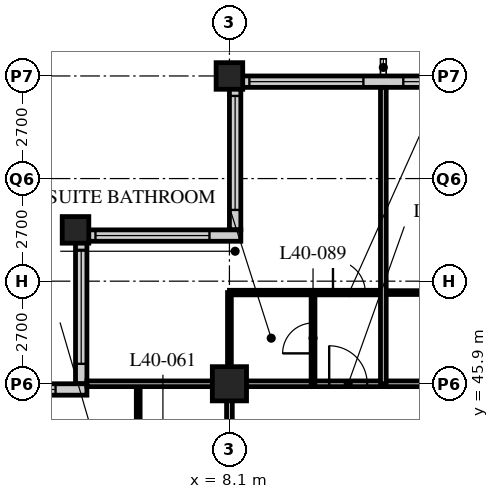
"""IFC4 building model, lengths in metres.
Left out: names, types, materials, properties, quantities, classifications, styles, units other than length and angle.
Written with IfcOpenShell. Run it as: python <this file> out.ifc"""

import sys

from ifc_helpers import new_model, si_unit, direction, frame, frame_2d, origin, origin_2d, place, context, subcontext, project, spatial, rectangle, hollow_rectangle, extrude, element, fill, save


model = new_model("IFC4")
c1 = context("Model", 3, precision=1e-05, world=origin(), true_north=direction((0.0, 1.0)))
c2 = subcontext(c1, "Body", "Model", "MODEL_VIEW")
j1 = project(units=[si_unit("LENGTHUNIT", "METRE"), si_unit("PLANEANGLEUNIT", "RADIAN")], contexts=[c1])
p1 = place(None, origin())
s1 = spatial("IfcSite", under=j1, at=p1, CompositionType="ELEMENT")
p2 = place(p1, origin())
s2 = spatial("IfcBuilding", under=s1, at=p2, CompositionType="ELEMENT")
p3 = place(p2, frame((0.0, 0.0, 154.4)))
s3 = spatial("IfcBuildingStorey", under=s2, at=p3, CompositionType="ELEMENT", Elevation=154.4)
p4 = place(p3, frame((4.05, 49.95, 0.0), z_axis=(0.0, 0.0, 1.0), x_axis=(1.0, 0.0, 0.0)))
e1 = element("IfcColumn", 1, at=p4, inside=s3, PredefinedType="COLUMN", context=c2, shape_type="SweptSolid", body=[
    extrude(hollow_rectangle(XDim=0.7, YDim=0.7, WallThickness=0.07, at=origin_2d()), origin(), (0.0, 0.0, 1.0), 3.4),
])
p5 = place(p3, frame((8.1, 45.9, 0.0), z_axis=(0.0, 0.0, 1.0), x_axis=(1.0, 0.0, 0.0)))
e2 = element("IfcColumn", 2, at=p5, inside=s3, PredefinedType="COLUMN", context=c2, shape_type="SweptSolid", body=[
    extrude(hollow_rectangle(XDim=0.9, YDim=0.9, WallThickness=0.1, at=origin_2d()), origin(), (0.0, 0.0, 1.0), 3.4),
])
p6 = place(p3, frame((8.1, 54.0, 0.0), z_axis=(0.0, 0.0, 1.0), x_axis=(1.0, 0.0, 0.0)))
e3 = element("IfcColumn", 3, at=p6, inside=s3, PredefinedType="COLUMN", context=c2, shape_type="SweptSolid", body=[
    extrude(hollow_rectangle(XDim=0.7, YDim=0.7, WallThickness=0.07, at=origin_2d()), origin(), (0.0, 0.0, 1.0), 3.4),
])
p7 = place(p3, frame((48.3, 53.85, 0.0), z_axis=(0.0, 0.0, 1.0), x_axis=(-1.0, 0.0, 0.0)))
e4 = element("IfcWall", 4, at=p7, inside=s3, PredefinedType="SOLIDWALL", context=c2, shape_type="SweptSolid", body=[
    extrude(rectangle(XDim=40.2, YDim=0.3, at=frame_2d((20.1, 0.0))), origin(), (0.0, 0.0, 1.0), 2.15),
])
p8 = place(p7, frame((0.225, 0.0, 0.9)))
e5 = element("IfcOpeningElement", 5, at=p8, cuts=e4, PredefinedType="OPENING", context=c2, shape_type="SweptSolid", body=[
    extrude(rectangle(XDim=3.0, YDim=1.2, at=frame_2d((1.5, 0.6))), frame((0.0, 0.16, 0.0), z_axis=(0.0, -1.0, 0.0), x_axis=(1.0, 0.0, 0.0)), (0.0, 0.0, 1.0), 0.32),
])
p9 = place(p7, frame((4.275, 0.0, 0.9)))
e6 = element("IfcOpeningElement", 6, at=p9, cuts=e4, PredefinedType="OPENING", context=c2, shape_type="SweptSolid", body=[
    extrude(rectangle(XDim=3.0, YDim=1.2, at=frame_2d((1.5, 0.6))), frame((0.0, 0.16, 0.0), z_axis=(0.0, -1.0, 0.0), x_axis=(1.0, 0.0, 0.0)), (0.0, 0.0, 1.0), 0.32),
])
p10 = place(p7, frame((8.325, 0.0, 0.9)))
e7 = element("IfcOpeningElement", 7, at=p10, cuts=e4, PredefinedType="OPENING", context=c2, shape_type="SweptSolid", body=[
    extrude(rectangle(XDim=3.0, YDim=1.2, at=frame_2d((1.5, 0.6))), frame((0.0, 0.16, 0.0), z_axis=(0.0, -1.0, 0.0), x_axis=(1.0, 0.0, 0.0)), (0.0, 0.0, 1.0), 0.32),
])
p11 = place(p7, frame((12.375, 0.0, 0.9)))
e8 = element("IfcOpeningElement", 8, at=p11, cuts=e4, PredefinedType="OPENING", context=c2, shape_type="SweptSolid", body=[
    extrude(rectangle(XDim=3.0, YDim=1.2, at=frame_2d((1.5, 0.6))), frame((0.0, 0.16, 0.0), z_axis=(0.0, -1.0, 0.0), x_axis=(1.0, 0.0, 0.0)), (0.0, 0.0, 1.0), 0.32),
])
p12 = place(p7, frame((16.425, 0.0, 0.9)))
e9 = element("IfcOpeningElement", 9, at=p12, cuts=e4, PredefinedType="OPENING", context=c2, shape_type="SweptSolid", body=[
    extrude(rectangle(XDim=3.0, YDim=1.2, at=frame_2d((1.5, 0.6))), frame((0.0, 0.16, 0.0), z_axis=(0.0, -1.0, 0.0), x_axis=(1.0, 0.0, 0.0)), (0.0, 0.0, 1.0), 0.32),
])
p13 = place(p7, frame((20.475, 0.0, 0.9)))
e10 = element("IfcOpeningElement", 10, at=p13, cuts=e4, PredefinedType="OPENING", context=c2, shape_type="SweptSolid", body=[
    extrude(rectangle(XDim=3.0, YDim=1.2, at=frame_2d((1.5, 0.6))), frame((0.0, 0.16, 0.0), z_axis=(0.0, -1.0, 0.0), x_axis=(1.0, 0.0, 0.0)), (0.0, 0.0, 1.0), 0.32),
])
p14 = place(p7, frame((24.525, 0.0, 0.9)))
e11 = element("IfcOpeningElement", 11, at=p14, cuts=e4, PredefinedType="OPENING", context=c2, shape_type="SweptSolid", body=[
    extrude(rectangle(XDim=3.0, YDim=1.2, at=frame_2d((1.5, 0.6))), frame((0.0, 0.16, 0.0), z_axis=(0.0, -1.0, 0.0), x_axis=(1.0, 0.0, 0.0)), (0.0, 0.0, 1.0), 0.32),
])
p15 = place(p7, frame((28.575, 0.0, 0.9)))
e12 = element("IfcOpeningElement", 12, at=p15, cuts=e4, PredefinedType="OPENING", context=c2, shape_type="SweptSolid", body=[
    extrude(rectangle(XDim=3.0, YDim=1.2, at=frame_2d((1.5, 0.6))), frame((0.0, 0.16, 0.0), z_axis=(0.0, -1.0, 0.0), x_axis=(1.0, 0.0, 0.0)), (0.0, 0.0, 1.0), 0.32),
])
p16 = place(p7, frame((32.625, 0.0, 0.9)))
e13 = element("IfcOpeningElement", 13, at=p16, cuts=e4, PredefinedType="OPENING", context=c2, shape_type="SweptSolid", body=[
    extrude(rectangle(XDim=3.0, YDim=1.2, at=frame_2d((1.5, 0.6))), frame((0.0, 0.16, 0.0), z_axis=(0.0, -1.0, 0.0), x_axis=(1.0, 0.0, 0.0)), (0.0, 0.0, 1.0), 0.32),
])
p17 = place(p7, frame((36.675, 0.0, 0.9)))
e14 = element("IfcOpeningElement", 14, at=p17, cuts=e4, PredefinedType="OPENING", context=c2, shape_type="SweptSolid", body=[
    extrude(rectangle(XDim=3.0, YDim=1.2, at=frame_2d((1.5, 0.6))), frame((0.0, 0.16, 0.0), z_axis=(0.0, -1.0, 0.0), x_axis=(1.0, 0.0, 0.0)), (0.0, 0.0, 1.0), 0.32),
])
p18 = place(p3, frame((8.25, 53.7, 0.0), z_axis=(0.0, 0.0, 1.0), x_axis=(0.0, -1.0, 0.0)))
e15 = element("IfcWall", 15, at=p18, inside=s3, PredefinedType="SOLIDWALL", context=c2, shape_type="SweptSolid", body=[
    extrude(rectangle(XDim=3.75, YDim=0.3, at=frame_2d((1.875, 0.0))), origin(), (0.0, 0.0, 1.0), 2.15),
])
p19 = place(p18, frame((0.225, 0.0, 0.9)))
e16 = element("IfcOpeningElement", 16, at=p19, cuts=e15, PredefinedType="OPENING", context=c2, shape_type="SweptSolid", body=[
    extrude(rectangle(XDim=3.0, YDim=1.2, at=frame_2d((1.5, 0.6))), frame((0.0, 0.16, 0.0), z_axis=(0.0, -1.0, 0.0), x_axis=(1.0, 0.0, 0.0)), (0.0, 0.0, 1.0), 0.32),
])
p20 = place(p3, frame((8.4, 49.8, 0.0), z_axis=(0.0, 0.0, 1.0), x_axis=(-1.0, 0.0, 0.0)))
e17 = element("IfcWall", 17, at=p20, inside=s3, PredefinedType="SOLIDWALL", context=c2, shape_type="SweptSolid", body=[
    extrude(rectangle(XDim=4.35, YDim=0.3, at=frame_2d((2.175, 0.0))), origin(), (0.0, 0.0, 1.0), 2.45),
])
p21 = place(p20, frame((0.825, 0.0, 0.9)))
e18 = element("IfcOpeningElement", 18, at=p21, cuts=e17, PredefinedType="OPENING", context=c2, shape_type="SweptSolid", body=[
    extrude(rectangle(XDim=3.0, YDim=1.2, at=frame_2d((1.5, 0.6))), frame((0.0, 0.16, 0.0), z_axis=(0.0, -1.0, 0.0), x_axis=(1.0, 0.0, 0.0)), (0.0, 0.0, 1.0), 0.32),
])
p22 = place(p3, frame((4.2, 49.65, 0.0), z_axis=(0.0, 0.0, 1.0), x_axis=(0.0, -1.0, 0.0)))
e19 = element("IfcWall", 19, at=p22, inside=s3, PredefinedType="SOLIDWALL", context=c2, shape_type="SweptSolid", body=[
    extrude(rectangle(XDim=3.75, YDim=0.3, at=frame_2d((1.875, 0.0))), origin(), (0.0, 0.0, 1.0), 2.45),
])
p23 = place(p22, frame((0.225, 0.0, 0.9)))
e20 = element("IfcOpeningElement", 20, at=p23, cuts=e19, PredefinedType="OPENING", context=c2, shape_type="SweptSolid", body=[
    extrude(rectangle(XDim=3.0, YDim=1.2, at=frame_2d((1.5, 0.6))), frame((0.0, 0.16, 0.0), z_axis=(0.0, -1.0, 0.0), x_axis=(1.0, 0.0, 0.0)), (0.0, 0.0, 1.0), 0.32),
])
p24 = place(p3, frame((4.35, 45.75, 0.0), z_axis=(0.0, 0.0, 1.0), x_axis=(-1.0, 0.0, 0.0)))
e21 = element("IfcWall", 21, at=p24, inside=s3, PredefinedType="SOLIDWALL", context=c2, shape_type="SweptSolid", body=[
    extrude(rectangle(XDim=4.35, YDim=0.3, at=frame_2d((2.175, 0.0))), origin(), (0.0, 0.0, 1.0), 2.15),
])
p25 = place(p24, frame((0.825, 0.0, 0.9)))
e22 = element("IfcOpeningElement", 22, at=p25, cuts=e21, PredefinedType="OPENING", context=c2, shape_type="SweptSolid", body=[
    extrude(rectangle(XDim=3.0, YDim=1.2, at=frame_2d((1.5, 0.6))), frame((0.0, 0.16, 0.0), z_axis=(0.0, -1.0, 0.0), x_axis=(1.0, 0.0, 0.0)), (0.0, 0.0, 1.0), 0.32),
])
p26 = place(p3, frame((8.1, 45.9, 0.0), z_axis=(0.0, 0.0, 1.0), x_axis=(1.0, 0.0, 0.0)))
e23 = element("IfcWall", 23, at=p26, inside=s3, PredefinedType="PARTITIONING", context=c2, shape_type="SweptSolid", body=[
    extrude(rectangle(XDim=40.5, YDim=0.15, at=frame_2d((20.25, 0.0))), origin(), (0.0, 0.0, 1.0), 2.15),
])
p27 = place(p26, frame((9.625, 0.0, 0.0)))
e24 = element("IfcOpeningElement", 24, at=p27, cuts=e23, PredefinedType="OPENING", context=c2, shape_type="SweptSolid", body=[
    extrude(rectangle(XDim=1.0, YDim=2.1, at=frame_2d((0.5, 1.05))), frame((0.0, 0.085, 0.0), z_axis=(0.0, -1.0, 0.0), x_axis=(1.0, 0.0, 0.0)), (0.0, 0.0, 1.0), 0.17),
])
p28 = place(p26, frame((21.775, 0.0, 0.0)))
e25 = element("IfcOpeningElement", 25, at=p28, cuts=e23, PredefinedType="OPENING", context=c2, shape_type="SweptSolid", body=[
    extrude(rectangle(XDim=1.0, YDim=2.1, at=frame_2d((0.5, 1.05))), frame((0.0, 0.085, 0.0), z_axis=(0.0, -1.0, 0.0), x_axis=(1.0, 0.0, 0.0)), (0.0, 0.0, 1.0), 0.17),
])
p29 = place(p26, frame((28.95, 0.0, 0.0)))
e26 = element("IfcOpeningElement", 26, at=p29, cuts=e23, PredefinedType="OPENING", context=c2, shape_type="SweptSolid", body=[
    extrude(rectangle(XDim=1.0, YDim=2.1, at=frame_2d((0.5, 1.05))), frame((0.0, 0.085, 0.0), z_axis=(0.0, -1.0, 0.0), x_axis=(1.0, 0.0, 0.0)), (0.0, 0.0, 1.0), 0.17),
])
p30 = place(p26, frame((34.85, 0.0, 0.0)))
e27 = element("IfcOpeningElement", 27, at=p30, cuts=e23, PredefinedType="OPENING", context=c2, shape_type="SweptSolid", body=[
    extrude(rectangle(XDim=1.0, YDim=2.1, at=frame_2d((0.5, 1.05))), frame((0.0, 0.085, 0.0), z_axis=(0.0, -1.0, 0.0), x_axis=(1.0, 0.0, 0.0)), (0.0, 0.0, 1.0), 0.17),
])
p31 = place(p26, frame((36.875, 0.0, 0.0)))
e28 = element("IfcOpeningElement", 28, at=p31, cuts=e23, PredefinedType="OPENING", context=c2, shape_type="SweptSolid", body=[
    extrude(rectangle(XDim=1.0, YDim=2.1, at=frame_2d((0.5, 1.05))), frame((0.0, 0.085, 0.0), z_axis=(0.0, -1.0, 0.0), x_axis=(1.0, 0.0, 0.0)), (0.0, 0.0, 1.0), 0.17),
])
p32 = place(p26, frame((2.625, 0.0, 0.0)))
e29 = element("IfcOpeningElement", 29, at=p32, cuts=e23, PredefinedType="OPENING", context=c2, shape_type="SweptSolid", body=[
    extrude(rectangle(XDim=1.0, YDim=2.1, at=frame_2d((0.5, 1.05))), frame((0.0, 0.085, 0.0), z_axis=(0.0, -1.0, 0.0), x_axis=(1.0, 0.0, 0.0)), (0.0, 0.0, 1.0), 0.17),
])
p33 = place(p3, frame((8.1, 17.55, 0.0), z_axis=(0.0, 0.0, 1.0), x_axis=(0.0, 1.0, 0.0)))
e30 = element("IfcWall", 30, at=p33, inside=s3, PredefinedType="PARTITIONING", context=c2, shape_type="SweptSolid", body=[
    extrude(rectangle(XDim=28.35, YDim=0.15, at=frame_2d((14.175, 0.0))), origin(), (0.0, 0.0, 1.0), 2.15),
])
p34 = place(p33, frame((5.95, 0.0, 0.0)))
e31 = element("IfcOpeningElement", 31, at=p34, cuts=e30, PredefinedType="OPENING", context=c2, shape_type="SweptSolid", body=[
    extrude(rectangle(XDim=1.0, YDim=2.1, at=frame_2d((0.5, 1.05))), frame((0.0, 0.085, 0.0), z_axis=(0.0, -1.0, 0.0), x_axis=(1.0, 0.0, 0.0)), (0.0, 0.0, 1.0), 0.17),
])
p35 = place(p33, frame((16.8, 0.0, 0.0)))
e32 = element("IfcOpeningElement", 32, at=p35, cuts=e30, PredefinedType="OPENING", context=c2, shape_type="SweptSolid", body=[
    extrude(rectangle(XDim=1.0, YDim=2.1, at=frame_2d((0.5, 1.05))), frame((0.0, 0.085, 0.0), z_axis=(0.0, -1.0, 0.0), x_axis=(1.0, 0.0, 0.0)), (0.0, 0.0, 1.0), 0.17),
])
p36 = place(p33, frame((22.7, 0.0, 0.0)))
e33 = element("IfcOpeningElement", 33, at=p36, cuts=e30, PredefinedType="OPENING", context=c2, shape_type="SweptSolid", body=[
    extrude(rectangle(XDim=1.0, YDim=2.1, at=frame_2d((0.5, 1.05))), frame((0.0, 0.085, 0.0), z_axis=(0.0, -1.0, 0.0), x_axis=(1.0, 0.0, 0.0)), (0.0, 0.0, 1.0), 0.17),
])
p37 = place(p33, frame((24.9, 0.0, 0.0)))
e34 = element("IfcOpeningElement", 34, at=p37, cuts=e30, PredefinedType="OPENING", context=c2, shape_type="SweptSolid", body=[
    extrude(rectangle(XDim=1.0, YDim=2.1, at=frame_2d((0.5, 1.05))), frame((0.0, 0.085, 0.0), z_axis=(0.0, -1.0, 0.0), x_axis=(1.0, 0.0, 0.0)), (0.0, 0.0, 1.0), 0.17),
])
p38 = place(p3, frame((12.15, 48.3, 0.0), z_axis=(0.0, 0.0, 1.0), x_axis=(1.0, 0.0, 0.0)))
e35 = element("IfcWall", 35, at=p38, inside=s3, PredefinedType="PARTITIONING", context=c2, shape_type="SweptSolid", body=[
    extrude(rectangle(XDim=2.6, YDim=0.1, at=frame_2d((1.3, 0.0))), origin(), (0.0, 0.0, 1.0), 3.15),
])
p39 = place(p3, frame((5.7, 43.6, 0.0), z_axis=(0.0, 0.0, 1.0), x_axis=(0.0, 1.0, 0.0)))
e36 = element("IfcWall", 36, at=p39, inside=s3, PredefinedType="PARTITIONING", context=c2, shape_type="SweptSolid", body=[
    extrude(rectangle(XDim=2.3, YDim=0.1, at=frame_2d((1.15, 0.0))), origin(), (0.0, 0.0, 1.0), 3.15),
])
p40 = place(p3, frame((8.1, 48.3, 0.0), z_axis=(0.0, 0.0, 1.0), x_axis=(1.0, 0.0, 0.0)))
e37 = element("IfcWall", 37, at=p40, inside=s3, PredefinedType="PARTITIONING", context=c2, shape_type="SweptSolid", body=[
    extrude(rectangle(XDim=4.05, YDim=0.12, at=frame_2d((2.025, 0.0))), origin(), (0.0, 0.0, 1.0), 3.15),
])
p41 = place(p40, frame((2.725, 0.0, 0.0)))
e38 = element("IfcOpeningElement", 38, at=p41, cuts=e37, PredefinedType="OPENING", context=c2, shape_type="SweptSolid", body=[
    extrude(rectangle(XDim=0.85, YDim=2.1, at=frame_2d((0.425, 1.05))), frame((0.0, 0.07, 0.0), z_axis=(0.0, -1.0, 0.0), x_axis=(1.0, 0.0, 0.0)), (0.0, 0.0, 1.0), 0.14),
])
p42 = place(p3, frame((10.3, 45.9, 0.0), z_axis=(0.0, 0.0, 1.0), x_axis=(0.0, 1.0, 0.0)))
e39 = element("IfcWall", 39, at=p42, inside=s3, PredefinedType="PARTITIONING", context=c2, shape_type="SweptSolid", body=[
    extrude(rectangle(XDim=2.4, YDim=0.1, at=frame_2d((1.2, 0.0))), origin(), (0.0, 0.0, 1.0), 3.15),
])
p43 = place(p42, frame((0.8, 0.0, 0.0)))
e40 = element("IfcOpeningElement", 40, at=p43, cuts=e39, PredefinedType="OPENING", context=c2, shape_type="SweptSolid", body=[
    extrude(rectangle(XDim=0.8, YDim=2.1, at=frame_2d((0.4, 1.05))), frame((0.0, 0.06, 0.0), z_axis=(0.0, -1.0, 0.0), x_axis=(1.0, 0.0, 0.0)), (0.0, 0.0, 1.0), 0.12),
])
p44 = place(p3, frame((8.1, 45.9, 0.0), z_axis=(0.0, 0.0, 1.0), x_axis=(0.0, 1.0, 0.0)))
e41 = element("IfcWall", 41, at=p44, inside=s3, PredefinedType="PARTITIONING", context=c2, shape_type="SweptSolid", body=[
    extrude(rectangle(XDim=2.4, YDim=0.1, at=frame_2d((1.2, 0.0))), origin(), (0.0, 0.0, 1.0), 2.15),
])
p45 = place(p3, frame((4.35, 45.9, 0.0), z_axis=(0.0, 0.0, 1.0), x_axis=(1.0, 0.0, 0.0)))
e42 = element("IfcWall", 42, at=p45, inside=s3, PredefinedType="PARTITIONING", context=c2, shape_type="SweptSolid", body=[
    extrude(rectangle(XDim=3.75, YDim=0.15, at=frame_2d((1.875, 0.0))), origin(), (0.0, 0.0, 1.0), 2.15),
])
p46 = place(p3, frame((12.15, 45.9, 0.0), z_axis=(0.0, 0.0, 1.0), x_axis=(0.0, 1.0, 0.0)))
e43 = element("IfcWall", 43, at=p46, inside=s3, PredefinedType="PARTITIONING", context=c2, shape_type="SweptSolid", body=[
    extrude(rectangle(XDim=7.8, YDim=0.15, at=frame_2d((3.9, 0.0))), origin(), (0.0, 0.0, 1.0), 3.15),
])
p47 = place(p16, origin())
e44 = element("IfcWindow", 44, at=p47, inside=s3, PartitioningType="SINGLE_PANEL", PredefinedType="WINDOW", context=c2, shape_type="SweptSolid", body=[
    extrude(rectangle(XDim=3.0, YDim=1.2, at=frame_2d((1.5, 0.6))), frame((0.0, 0.03, 0.0), z_axis=(0.0, -1.0, 0.0), x_axis=(1.0, 0.0, 0.0)), (0.0, 0.0, 1.0), 0.06),
])
fill(e13, e44)
p48 = place(p17, origin())
e45 = element("IfcWindow", 45, at=p48, inside=s3, PartitioningType="SINGLE_PANEL", PredefinedType="WINDOW", context=c2, shape_type="SweptSolid", body=[
    extrude(rectangle(XDim=3.0, YDim=1.2, at=frame_2d((1.5, 0.6))), frame((0.0, 0.03, 0.0), z_axis=(0.0, -1.0, 0.0), x_axis=(1.0, 0.0, 0.0)), (0.0, 0.0, 1.0), 0.06),
])
fill(e14, e45)
p49 = place(p19, origin())
e46 = element("IfcWindow", 46, at=p49, inside=s3, PartitioningType="SINGLE_PANEL", PredefinedType="WINDOW", context=c2, shape_type="SweptSolid", body=[
    extrude(rectangle(XDim=3.0, YDim=1.2, at=frame_2d((1.5, 0.6))), frame((0.0, 0.03, 0.0), z_axis=(0.0, -1.0, 0.0), x_axis=(1.0, 0.0, 0.0)), (0.0, 0.0, 1.0), 0.06),
])
fill(e16, e46)
p50 = place(p21, origin())
e47 = element("IfcWindow", 47, at=p50, inside=s3, PartitioningType="SINGLE_PANEL", PredefinedType="WINDOW", context=c2, shape_type="SweptSolid", body=[
    extrude(rectangle(XDim=3.0, YDim=1.2, at=frame_2d((1.5, 0.6))), frame((0.0, 0.03, 0.0), z_axis=(0.0, -1.0, 0.0), x_axis=(1.0, 0.0, 0.0)), (0.0, 0.0, 1.0), 0.06),
])
fill(e18, e47)
p51 = place(p23, origin())
e48 = element("IfcWindow", 48, at=p51, inside=s3, PartitioningType="SINGLE_PANEL", PredefinedType="WINDOW", context=c2, shape_type="SweptSolid", body=[
    extrude(rectangle(XDim=3.0, YDim=1.2, at=frame_2d((1.5, 0.6))), frame((0.0, 0.03, 0.0), z_axis=(0.0, -1.0, 0.0), x_axis=(1.0, 0.0, 0.0)), (0.0, 0.0, 1.0), 0.06),
])
fill(e20, e48)
p52 = place(p25, origin())
e49 = element("IfcWindow", 49, at=p52, inside=s3, PartitioningType="SINGLE_PANEL", PredefinedType="WINDOW", context=c2, shape_type="SweptSolid", body=[
    extrude(rectangle(XDim=3.0, YDim=1.2, at=frame_2d((1.5, 0.6))), frame((0.0, 0.03, 0.0), z_axis=(0.0, -1.0, 0.0), x_axis=(1.0, 0.0, 0.0)), (0.0, 0.0, 1.0), 0.06),
])
fill(e22, e49)
p53 = place(p43, origin())
e50 = element("IfcDoor", 50, at=p53, inside=s3, OperationType="SINGLE_SWING_LEFT", PredefinedType="DOOR", context=c2, shape_type="SweptSolid", body=[
    extrude(rectangle(XDim=0.8, YDim=2.1, at=frame_2d((0.4, 1.05))), frame((0.0, 0.025, 0.0), z_axis=(0.0, -1.0, 0.0), x_axis=(1.0, 0.0, 0.0)), (0.0, 0.0, 1.0), 0.05),
])
fill(e40, e50)
p54 = place(p32, origin())
e51 = element("IfcDoor", 51, at=p54, inside=s3, OperationType="SINGLE_SWING_LEFT", PredefinedType="DOOR", context=c2, shape_type="SweptSolid", body=[
    extrude(rectangle(XDim=1.0, YDim=2.1, at=frame_2d((0.5, 1.05))), frame((0.0, 0.025, 0.0), z_axis=(0.0, -1.0, 0.0), x_axis=(1.0, 0.0, 0.0)), (0.0, 0.0, 1.0), 0.05),
])
fill(e29, e51)
p55 = place(p41, origin())
e52 = element("IfcDoor", 52, at=p55, inside=s3, OperationType="SINGLE_SWING_LEFT", PredefinedType="DOOR", context=c2, shape_type="SweptSolid", body=[
    extrude(rectangle(XDim=0.85, YDim=2.1, at=frame_2d((0.425, 1.05))), frame((0.0, 0.025, 0.0), z_axis=(0.0, -1.0, 0.0), x_axis=(1.0, 0.0, 0.0)), (0.0, 0.0, 1.0), 0.05),
])
fill(e38, e52)
save(model, sys.argv[1])
